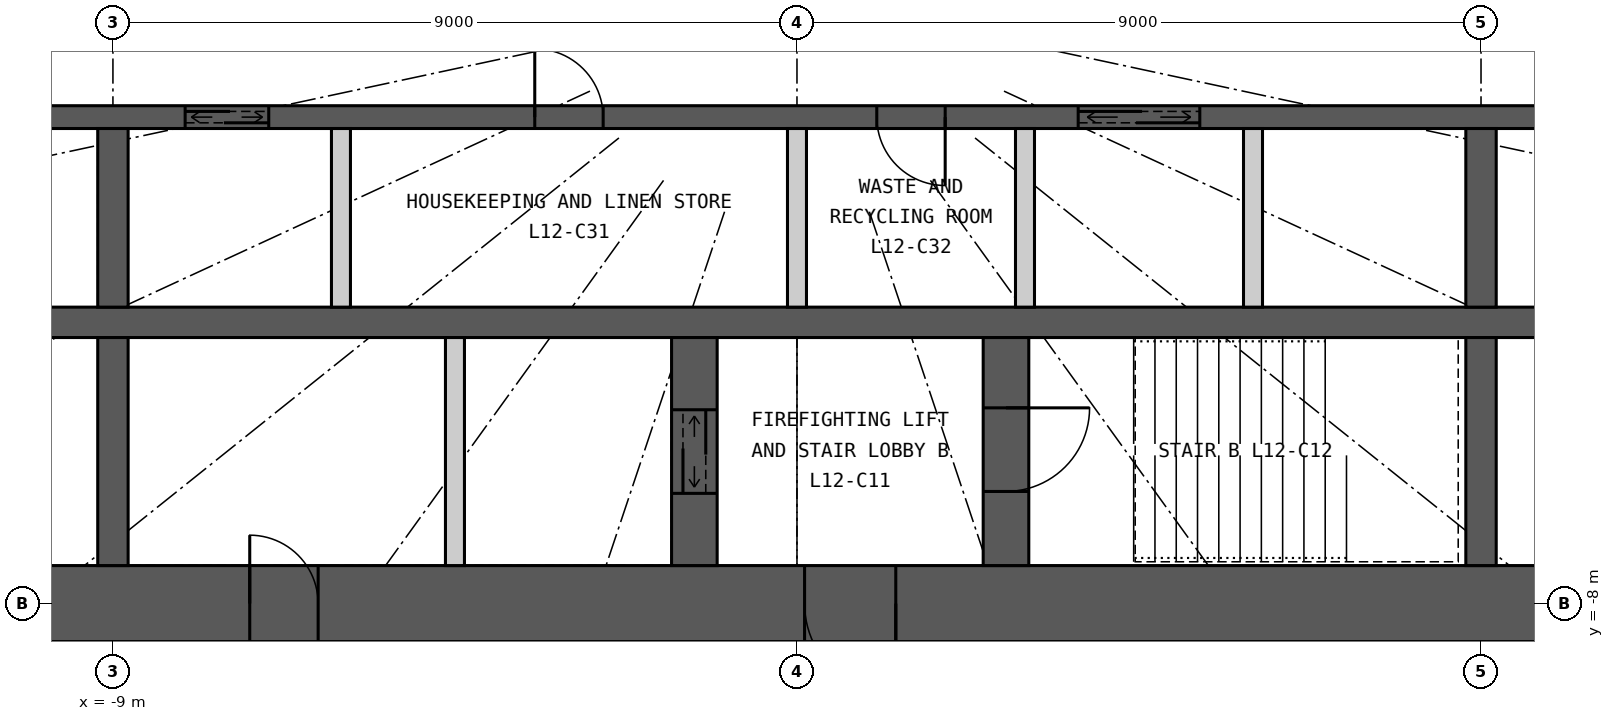
"""IFC4 building model, lengths in metres.
Left out: names, types, materials, properties, quantities, classifications, styles, units other than length and angle.
Written with IfcOpenShell. Run it as: python <this file> out.ifc"""

import sys

from ifc_helpers import new_model, si_unit, direction, frame, frame_2d, origin, place, context, subcontext, project, spatial, rectangle, extrude, element, fill, save


model = new_model("IFC4")
c1 = context("Model", 3, precision=1e-05, world=origin(), true_north=direction((0.0, 1.0)))
c2 = subcontext(c1, "Body", "Model", "MODEL_VIEW")
j1 = project(units=[si_unit("LENGTHUNIT", "METRE"), si_unit("PLANEANGLEUNIT", "RADIAN")], contexts=[c1])
p1 = place(None, origin())
s1 = spatial("IfcSite", under=j1, at=p1, CompositionType="ELEMENT")
p2 = place(p1, origin())
s2 = spatial("IfcBuilding", under=s1, at=p2, CompositionType="ELEMENT")
p3 = place(p2, frame((0.0, 0.0, 54.0)))
s3 = spatial("IfcBuildingStorey", under=s2, at=p3, CompositionType="ELEMENT", Elevation=54.0)
p4 = place(p3, frame((12.5, -8.0, 0.0), z_axis=(0.0, 0.0, 1.0), x_axis=(-1.0, 0.0, 0.0)))
e1 = element("IfcWall", 1, at=p4, inside=s3, PredefinedType="SHEAR", context=c2, shape_type="SweptSolid", body=[
    extrude(rectangle(XDim=25.0, YDim=1.0, at=frame_2d((12.5, 0.0))), origin(), (0.0, 0.0, 1.0), 3.3),
])
p5 = place(p4, frame((11.2, 0.0, 0.0)))
e2 = element("IfcOpeningElement", 2, at=p5, cuts=e1, PredefinedType="OPENING", context=c2, shape_type="SweptSolid", body=[
    extrude(rectangle(XDim=1.2, YDim=2.2, at=frame_2d((0.6, 1.1))), frame((0.0, 0.51, 0.0), z_axis=(0.0, -1.0, 0.0), x_axis=(1.0, 0.0, 0.0)), (0.0, 0.0, 1.0), 1.02),
])
p6 = place(p4, frame((18.8, 0.0, 0.0)))
e3 = element("IfcOpeningElement", 3, at=p6, cuts=e1, PredefinedType="OPENING", context=c2, shape_type="SweptSolid", body=[
    extrude(rectangle(XDim=0.9, YDim=2.2, at=frame_2d((0.45, 1.1))), frame((0.0, 0.51, 0.0), z_axis=(0.0, -1.0, 0.0), x_axis=(1.0, 0.0, 0.0)), (0.0, 0.0, 1.0), 1.02),
])
p7 = place(p3, frame((-11.5, -4.3, 0.0), z_axis=(0.0, 0.0, 1.0), x_axis=(1.0, 0.0, 0.0)))
e4 = element("IfcWall", 4, at=p7, inside=s3, PredefinedType="SHEAR", context=c2, shape_type="SweptSolid", body=[
    extrude(rectangle(XDim=23.0, YDim=0.4, at=frame_2d((11.5, 0.0))), origin(), (0.0, 0.0, 1.0), 3.3),
])
p8 = place(p3, frame((-11.5, -1.6, 0.0), z_axis=(0.0, 0.0, 1.0), x_axis=(1.0, 0.0, 0.0)))
e5 = element("IfcWall", 5, at=p8, inside=s3, PredefinedType="SHEAR", context=c2, shape_type="SweptSolid", body=[
    extrude(rectangle(XDim=23.0, YDim=0.3, at=frame_2d((11.5, 0.0))), origin(), (0.0, 0.0, 1.0), 3.3),
])
p9 = place(p8, frame((0.45, 0.0, 0.0)))
e6 = element("IfcOpeningElement", 6, at=p9, cuts=e5, PredefinedType="OPENING", context=c2, shape_type="SweptSolid", body=[
    extrude(rectangle(XDim=1.1, YDim=2.2, at=frame_2d((0.55, 1.1))), frame((0.0, 0.16, 0.0), z_axis=(0.0, -1.0, 0.0), x_axis=(1.0, 0.0, 0.0)), (0.0, 0.0, 1.0), 0.32),
])
p10 = place(p8, frame((3.45, 0.0, 0.0)))
e7 = element("IfcOpeningElement", 7, at=p10, cuts=e5, PredefinedType="OPENING", context=c2, shape_type="SweptSolid", body=[
    extrude(rectangle(XDim=1.1, YDim=2.2, at=frame_2d((0.55, 1.1))), frame((0.0, 0.16, 0.0), z_axis=(0.0, -1.0, 0.0), x_axis=(1.0, 0.0, 0.0)), (0.0, 0.0, 1.0), 0.32),
])
p11 = place(p8, frame((15.2, 0.0, 0.0)))
e8 = element("IfcOpeningElement", 8, at=p11, cuts=e5, PredefinedType="OPENING", context=c2, shape_type="SweptSolid", body=[
    extrude(rectangle(XDim=1.6, YDim=2.4, at=frame_2d((0.8, 1.2))), frame((0.0, 0.16, 0.0), z_axis=(0.0, -1.0, 0.0), x_axis=(1.0, 0.0, 0.0)), (0.0, 0.0, 1.0), 0.32),
])
p12 = place(p8, frame((8.05, 0.0, 0.0)))
e9 = element("IfcOpeningElement", 9, at=p12, cuts=e5, PredefinedType="OPENING", context=c2, shape_type="SweptSolid", body=[
    extrude(rectangle(XDim=0.9, YDim=2.2, at=frame_2d((0.45, 1.1))), frame((0.0, 0.16, 0.0), z_axis=(0.0, -1.0, 0.0), x_axis=(1.0, 0.0, 0.0)), (0.0, 0.0, 1.0), 0.32),
])
p13 = place(p8, frame((12.55, 0.0, 0.0)))
e10 = element("IfcOpeningElement", 10, at=p13, cuts=e5, PredefinedType="OPENING", context=c2, shape_type="SweptSolid", body=[
    extrude(rectangle(XDim=0.9, YDim=2.2, at=frame_2d((0.45, 1.1))), frame((0.0, 0.16, 0.0), z_axis=(0.0, -1.0, 0.0), x_axis=(1.0, 0.0, 0.0)), (0.0, 0.0, 1.0), 0.32),
])
p14 = place(p3, frame((-9.0, -4.1, 0.0), z_axis=(0.0, 0.0, 1.0), x_axis=(0.0, 1.0, 0.0)))
e11 = element("IfcWall", 11, at=p14, inside=s3, PredefinedType="SHEAR", context=c2, shape_type="SweptSolid", body=[
    extrude(rectangle(XDim=2.35, YDim=0.4, at=frame_2d((1.175, 0.0))), origin(), (0.0, 0.0, 1.0), 3.3),
])
p15 = place(p3, frame((-9.0, -7.5, 0.0), z_axis=(0.0, 0.0, 1.0), x_axis=(0.0, 1.0, 0.0)))
e12 = element("IfcWall", 12, at=p15, inside=s3, PredefinedType="SHEAR", context=c2, shape_type="SweptSolid", body=[
    extrude(rectangle(XDim=3.0, YDim=0.4, at=frame_2d((1.5, 0.0))), origin(), (0.0, 0.0, 1.0), 3.3),
])
p16 = place(p3, frame((9.0, -4.1, 0.0), z_axis=(0.0, 0.0, 1.0), x_axis=(0.0, 1.0, 0.0)))
e13 = element("IfcWall", 13, at=p16, inside=s3, PredefinedType="SHEAR", context=c2, shape_type="SweptSolid", body=[
    extrude(rectangle(XDim=2.35, YDim=0.4, at=frame_2d((1.175, 0.0))), origin(), (0.0, 0.0, 1.0), 3.3),
])
p17 = place(p3, frame((9.0, -7.5, 0.0), z_axis=(0.0, 0.0, 1.0), x_axis=(0.0, 1.0, 0.0)))
e14 = element("IfcWall", 14, at=p17, inside=s3, PredefinedType="SHEAR", context=c2, shape_type="SweptSolid", body=[
    extrude(rectangle(XDim=3.0, YDim=0.4, at=frame_2d((1.5, 0.0))), origin(), (0.0, 0.0, 1.0), 3.3),
])
p18 = place(p3, frame((2.75, -7.5, 0.0), z_axis=(0.0, 0.0, 1.0), x_axis=(0.0, 1.0, 0.0)))
e15 = element("IfcWall", 15, at=p18, inside=s3, PredefinedType="SHEAR", context=c2, shape_type="SweptSolid", body=[
    extrude(rectangle(XDim=3.0, YDim=0.6, at=frame_2d((1.5, 0.0))), origin(), (0.0, 0.0, 1.0), 3.3),
])
p19 = place(p18, frame((0.975, 0.0, 0.0)))
e16 = element("IfcOpeningElement", 16, at=p19, cuts=e15, PredefinedType="OPENING", context=c2, shape_type="SweptSolid", body=[
    extrude(rectangle(XDim=1.1, YDim=2.2, at=frame_2d((0.55, 1.1))), frame((0.0, 0.31, 0.0), z_axis=(0.0, -1.0, 0.0), x_axis=(1.0, 0.0, 0.0)), (0.0, 0.0, 1.0), 0.62),
])
p20 = place(p3, frame((-1.35, -7.5, 0.0), z_axis=(0.0, 0.0, 1.0), x_axis=(0.0, 1.0, 0.0)))
e17 = element("IfcWall", 17, at=p20, inside=s3, PredefinedType="SHEAR", context=c2, shape_type="SweptSolid", body=[
    extrude(rectangle(XDim=3.0, YDim=0.6, at=frame_2d((1.5, 0.0))), origin(), (0.0, 0.0, 1.0), 3.3),
])
p21 = place(p20, frame((0.95, 0.0, 0.0)))
e18 = element("IfcOpeningElement", 18, at=p21, cuts=e17, PredefinedType="OPENING", context=c2, shape_type="SweptSolid", body=[
    extrude(rectangle(XDim=1.1, YDim=2.2, at=frame_2d((0.55, 1.1))), frame((0.0, 0.31, 0.0), z_axis=(0.0, -1.0, 0.0), x_axis=(1.0, 0.0, 0.0)), (0.0, 0.0, 1.0), 0.62),
])
p22 = place(p3, frame((-4.5, -7.5, 0.0), z_axis=(0.0, 0.0, 1.0), x_axis=(0.0, 1.0, 0.0)))
e19 = element("IfcWall", 19, at=p22, inside=s3, PredefinedType="PARTITIONING", context=c2, shape_type="SweptSolid", body=[
    extrude(rectangle(XDim=3.0, YDim=0.25, at=frame_2d((1.5, 0.0))), origin(), (0.0, 0.0, 1.0), 3.3),
])
for number, where, z_axis, x_axis in (
    (20, (-6.0, -4.1, 0.0), (0.0, 0.0, 1.0), (0.0, 1.0, 0.0)),
    (21, (0.0, -4.1, 0.0), (0.0, 0.0, 1.0), (0.0, 1.0, 0.0)),
    (22, (3.0, -4.1, 0.0), (0.0, 0.0, 1.0), (0.0, 1.0, 0.0)),
    (23, (6.0, -4.1, 0.0), (0.0, 0.0, 1.0), (0.0, 1.0, 0.0)),
):
    element("IfcWall", number, at=place(p3, frame(where, z_axis=z_axis, x_axis=x_axis)), inside=s3, PredefinedType="PARTITIONING", context=c2, shape_type="SweptSolid", body=[
        extrude(rectangle(XDim=2.35, YDim=0.25, at=frame_2d((1.175, 0.0))), origin(), (0.0, 0.0, 1.0), 3.3),
    ])
p23 = place(p5, origin())
e24 = element("IfcDoor", 24, at=p23, inside=s3, OperationType="SINGLE_SWING_LEFT", PredefinedType="DOOR", context=c2, shape_type="SweptSolid", body=[
    extrude(rectangle(XDim=1.2, YDim=2.2, at=frame_2d((0.6, 1.1))), frame((0.0, 0.025, 0.0), z_axis=(0.0, -1.0, 0.0), x_axis=(1.0, 0.0, 0.0)), (0.0, 0.0, 1.0), 0.05),
])
fill(e2, e24)
p24 = place(p19, origin())
e25 = element("IfcDoor", 25, at=p24, inside=s3, OperationType="SINGLE_SWING_RIGHT", PredefinedType="DOOR", context=c2, shape_type="SweptSolid", body=[
    extrude(rectangle(XDim=1.1, YDim=2.2, at=frame_2d((0.55, 1.1))), frame((0.0, 0.025, 0.0), z_axis=(0.0, -1.0, 0.0), x_axis=(1.0, 0.0, 0.0)), (0.0, 0.0, 1.0), 0.05),
])
fill(e16, e25)
p25 = place(p21, origin())
e26 = element("IfcDoor", 26, at=p25, inside=s3, OperationType="DOUBLE_DOOR_SLIDING", PredefinedType="DOOR", context=c2, shape_type="SweptSolid", body=[
    extrude(rectangle(XDim=1.1, YDim=2.2, at=frame_2d((0.55, 1.1))), frame((0.0, 0.025, 0.0), z_axis=(0.0, -1.0, 0.0), x_axis=(1.0, 0.0, 0.0)), (0.0, 0.0, 1.0), 0.05),
])
fill(e18, e26)
p26 = place(p6, origin())
e27 = element("IfcDoor", 27, at=p26, inside=s3, OperationType="SINGLE_SWING_RIGHT", PredefinedType="DOOR", context=c2, shape_type="SweptSolid", body=[
    extrude(rectangle(XDim=0.9, YDim=2.2, at=frame_2d((0.45, 1.1))), frame((0.0, 0.025, 0.0), z_axis=(0.0, -1.0, 0.0), x_axis=(1.0, 0.0, 0.0)), (0.0, 0.0, 1.0), 0.05),
])
fill(e3, e27)
p27 = place(p10, origin())
e28 = element("IfcDoor", 28, at=p27, inside=s3, OperationType="DOUBLE_DOOR_SLIDING", PredefinedType="DOOR", context=c2, shape_type="SweptSolid", body=[
    extrude(rectangle(XDim=1.1, YDim=2.2, at=frame_2d((0.55, 1.1))), frame((0.0, 0.025, 0.0), z_axis=(0.0, -1.0, 0.0), x_axis=(1.0, 0.0, 0.0)), (0.0, 0.0, 1.0), 0.05),
])
fill(e7, e28)
p28 = place(p11, origin())
e29 = element("IfcDoor", 29, at=p28, inside=s3, OperationType="DOUBLE_DOOR_SLIDING", PredefinedType="DOOR", context=c2, shape_type="SweptSolid", body=[
    extrude(rectangle(XDim=1.6, YDim=2.4, at=frame_2d((0.8, 1.2))), frame((0.0, 0.025, 0.0), z_axis=(0.0, -1.0, 0.0), x_axis=(1.0, 0.0, 0.0)), (0.0, 0.0, 1.0), 0.05),
])
fill(e8, e29)
p29 = place(p12, origin())
e30 = element("IfcDoor", 30, at=p29, inside=s3, OperationType="SINGLE_SWING_LEFT", PredefinedType="DOOR", context=c2, shape_type="SweptSolid", body=[
    extrude(rectangle(XDim=0.9, YDim=2.2, at=frame_2d((0.45, 1.1))), frame((0.0, 0.025, 0.0), z_axis=(0.0, -1.0, 0.0), x_axis=(1.0, 0.0, 0.0)), (0.0, 0.0, 1.0), 0.05),
])
fill(e9, e30)
p30 = place(p13, origin())
e31 = element("IfcDoor", 31, at=p30, inside=s3, OperationType="SINGLE_SWING_RIGHT", PredefinedType="DOOR", context=c2, shape_type="SweptSolid", body=[
    extrude(rectangle(XDim=0.9, YDim=2.2, at=frame_2d((0.45, 1.1))), frame((0.0, 0.025, 0.0), z_axis=(0.0, -1.0, 0.0), x_axis=(1.0, 0.0, 0.0)), (0.0, 0.0, 1.0), 0.05),
])
fill(e10, e31)
save(model, sys.argv[1])
